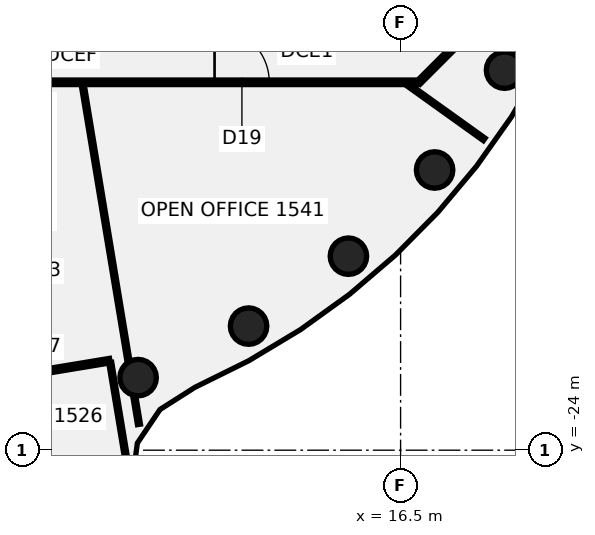
"""IFC4 building model, lengths in metres.
Left out: names, types, materials, properties, quantities, classifications, styles, units other than length and angle.
Written with IfcOpenShell. Run it as: python <this file> out.ifc"""

import sys

from ifc_helpers import new_model, si_unit, direction, frame, frame_2d, origin, origin_2d, place, context, subcontext, project, spatial, rectangle, circle, extrude, element, fill, save


model = new_model("IFC4")
c1 = context("Model", 3, precision=1e-05, world=origin(), true_north=direction((0.0, 1.0)))
c2 = subcontext(c1, "Body", "Model", "MODEL_VIEW")
j1 = project(units=[si_unit("LENGTHUNIT", "METRE"), si_unit("PLANEANGLEUNIT", "RADIAN")], contexts=[c1])
p1 = place(None, origin())
s1 = spatial("IfcSite", under=j1, at=p1, CompositionType="ELEMENT")
p2 = place(p1, origin())
s2 = spatial("IfcBuilding", under=s1, at=p2, CompositionType="ELEMENT")
p3 = place(p2, frame((0.0, 0.0, 67.75)))
s3 = spatial("IfcBuildingStorey", under=s2, at=p3, CompositionType="ELEMENT", Elevation=67.75)
for number, where, z_axis, x_axis in (
    (1, (7.866, -21.613, -0.14), (0.0, 0.0, 1.0), (1.0, 0.0, 0.0)),
    (2, (11.5, -19.919, -0.14), (0.0, 0.0, 1.0), (1.0, 0.0, 0.0)),
    (3, (14.784, -17.619, -0.14), (0.0, 0.0, 1.0), (1.0, 0.0, 0.0)),
    (4, (17.619, -14.784, -0.14), (0.0, 0.0, 1.0), (1.0, 0.0, 0.0)),
    (5, (19.919, -11.5, -0.14), (0.0, 0.0, 1.0), (1.0, 0.0, 0.0)),
):
    element("IfcColumn", number, at=place(p3, frame(where, z_axis=z_axis, x_axis=x_axis)), inside=s3, PredefinedType="COLUMN", context=c2, shape_type="SweptSolid", body=[
        extrude(circle(Radius=0.6, at=origin_2d()), origin(), (0.0, 0.0, 1.0), 3.75),
    ])
p4 = place(p3, frame((6.042, -11.964, 0.0), z_axis=(0.0, 0.0, 1.0), x_axis=(0.163346366562, -0.986568783477, 0.0)))
e6 = element("IfcWall", 6, at=p4, inside=s3, PredefinedType="PARTITIONING", context=c2, shape_type="SweptSolid", body=[
    extrude(rectangle(XDim=9.253, YDim=0.1, at=frame_2d((4.626, 0.0))), origin(), (0.0, 0.0, 1.0), 3.01),
])
p5 = place(p3, frame((7.734, -22.188, 0.0), z_axis=(0.0, 0.0, 1.0), x_axis=(0.163263648391, -0.986582475576, 0.0)))
e7 = element("IfcWall", 7, at=p5, inside=s3, PredefinedType="PARTITIONING", context=c2, shape_type="SweptSolid", body=[
    extrude(rectangle(XDim=0.977, YDim=0.1, at=frame_2d((0.488, 0.0))), origin(), (0.0, 0.0, 1.0), 3.01),
])
p6 = place(p3, frame((6.95, -21.118, 0.0), z_axis=(0.0, 0.0, 1.0), x_axis=(0.163298713536, -0.986576672214, 0.0)))
e8 = element("IfcWall", 8, at=p6, inside=s3, PredefinedType="PARTITIONING", context=c2, shape_type="SweptSolid", body=[
    extrude(rectangle(XDim=3.095, YDim=0.1, at=frame_2d((1.547, 0.0))), origin(), (0.0, 0.0, 1.0), 3.01),
])
p7 = place(p3, frame((16.763, -11.997, 0.0), z_axis=(0.0, 0.0, 1.0), x_axis=(0.813183335606, -0.582007613947, 0.0)))
e9 = element("IfcWall", 9, at=p7, inside=s3, PredefinedType="PARTITIONING", context=c2, shape_type="SweptSolid", body=[
    extrude(rectangle(XDim=3.061, YDim=0.1, at=frame_2d((1.53, 0.0))), origin(), (0.0, 0.0, 1.0), 3.01),
])
p8 = place(p3, frame((-17.1, -11.9, 0.0), z_axis=(0.0, 0.0, 1.0), x_axis=(1.0, 0.0, 0.0)))
e10 = element("IfcWall", 10, at=p8, inside=s3, PredefinedType="PARTITIONING", context=c2, shape_type="SweptSolid", body=[
    extrude(rectangle(XDim=34.165, YDim=0.15, at=frame_2d((17.083, 0.0))), origin(), (0.0, 0.0, 1.0), 3.01),
])
p9 = place(p8, frame((14.531, 0.0, 0.0)))
e11 = element("IfcOpeningElement", 11, at=p9, cuts=e10, PredefinedType="OPENING", context=c2, shape_type="SweptSolid", body=[
    extrude(rectangle(XDim=1.8, YDim=2.1, at=frame_2d((0.9, 1.05))), frame((0.0, 0.085, 0.0), z_axis=(0.0, -1.0, 0.0), x_axis=(1.0, 0.0, 0.0)), (0.0, 0.0, 1.0), 0.17),
])
p10 = place(p8, frame((2.1, 0.0, 0.0)))
e12 = element("IfcOpeningElement", 12, at=p10, cuts=e10, PredefinedType="OPENING", context=c2, shape_type="SweptSolid", body=[
    extrude(rectangle(XDim=1.8, YDim=2.1, at=frame_2d((0.9, 1.05))), frame((0.0, 0.085, 0.0), z_axis=(0.0, -1.0, 0.0), x_axis=(1.0, 0.0, 0.0)), (0.0, 0.0, 1.0), 0.17),
])
p11 = place(p8, frame((27.481, 0.0, 0.0)))
e13 = element("IfcOpeningElement", 13, at=p11, cuts=e10, PredefinedType="OPENING", context=c2, shape_type="SweptSolid", body=[
    extrude(rectangle(XDim=1.8, YDim=2.1, at=frame_2d((0.9, 1.05))), frame((0.0, 0.085, 0.0), z_axis=(0.0, -1.0, 0.0), x_axis=(1.0, 0.0, 0.0)), (0.0, 0.0, 1.0), 0.17),
])
p12 = place(p3, frame((2.992, -21.707, 0.0), z_axis=(0.0, 0.0, 1.0), x_axis=(0.986586214289, 0.163241054198, 0.0)))
e14 = element("IfcWall", 14, at=p12, inside=s3, PredefinedType="PARTITIONING", context=c2, shape_type="SweptSolid", body=[
    extrude(rectangle(XDim=4.001, YDim=0.15, at=frame_2d((2.0, 0.0))), origin(), (0.0, 0.0, 1.0), 3.01),
])
p13 = place(p3, frame((17.1, -11.9, 0.0), z_axis=(0.0, 0.0, 1.0), x_axis=(0.707106781187, 0.707106781187, 0.0)))
e15 = element("IfcWall", 15, at=p13, inside=s3, PredefinedType="PARTITIONING", context=c2, shape_type="SweptSolid", body=[
    extrude(rectangle(XDim=2.505, YDim=0.15, at=frame_2d((1.253, 0.0))), origin(), (0.0, 0.0, 1.0), 3.01),
])
p14 = place(p11, frame((1.8, 0.0, 0.0), z_axis=(0.0, 0.0, 1.0), x_axis=(-1.0, 0.0, 0.0)))
e16 = element("IfcDoor", 16, at=p14, inside=s3, OperationType="DOUBLE_DOOR_SINGLE_SWING", PredefinedType="DOOR", context=c2, shape_type="SweptSolid", body=[
    extrude(rectangle(XDim=1.8, YDim=2.1, at=frame_2d((0.9, 1.05))), frame((0.0, 0.025, 0.0), z_axis=(0.0, -1.0, 0.0), x_axis=(1.0, 0.0, 0.0)), (0.0, 0.0, 1.0), 0.05),
])
fill(e13, e16)
save(model, sys.argv[1])
